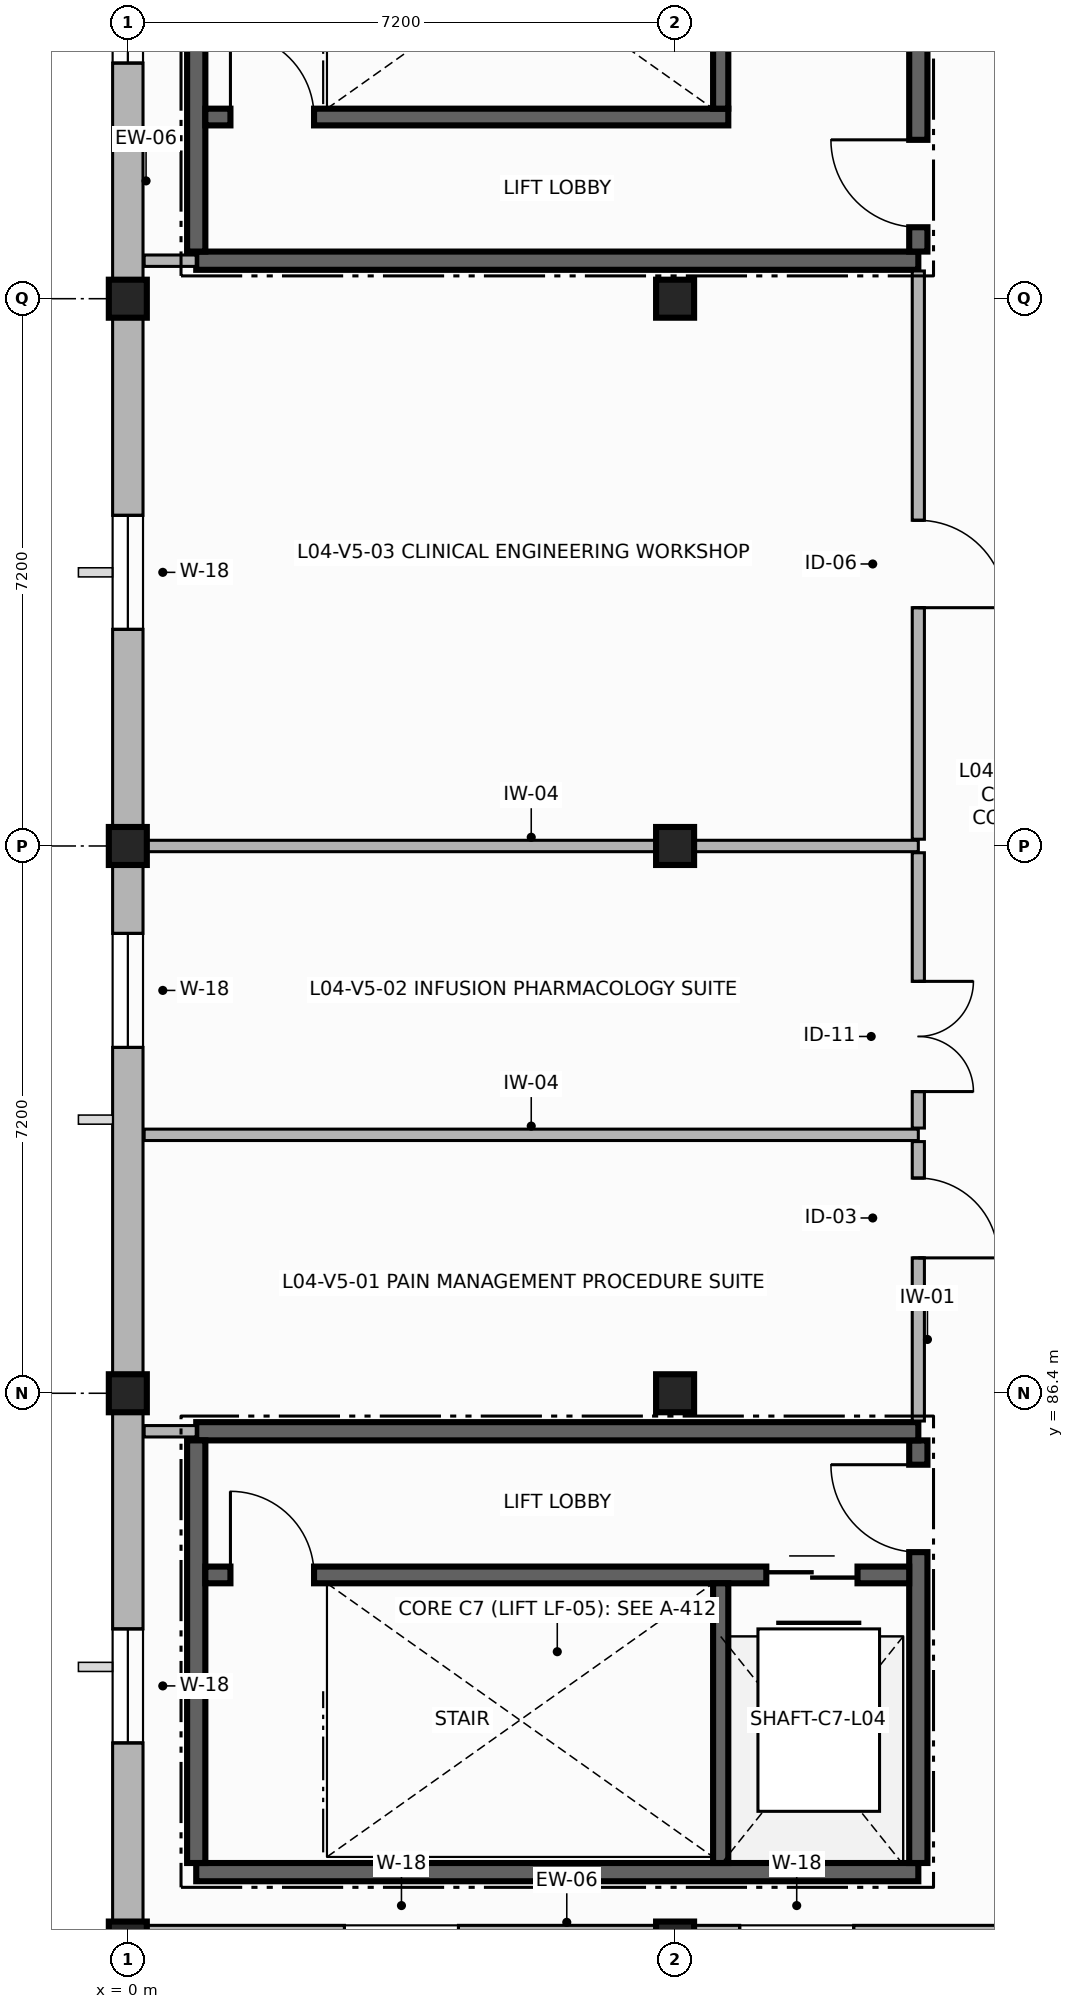
"""IFC4 building model, lengths in metres.
Left out: names, types, materials, properties, quantities, classifications, styles, units other than length and angle.
Written with IfcOpenShell. Run it as: python <this file> out.ifc"""

import sys

from ifc_helpers import new_model, si_unit, direction, frame, frame_2d, origin, origin_2d, place, context, subcontext, project, spatial, rectangle, extrude, element, fill, save


model = new_model("IFC4")
c1 = context("Model", 3, precision=1e-05, world=origin(), true_north=direction((0.0, 1.0)))
c2 = subcontext(c1, "Body", "Model", "MODEL_VIEW")
j1 = project(units=[si_unit("LENGTHUNIT", "METRE"), si_unit("PLANEANGLEUNIT", "RADIAN")], contexts=[c1])
p1 = place(None, origin())
s1 = spatial("IfcSite", under=j1, at=p1, CompositionType="ELEMENT")
p2 = place(p1, origin())
s2 = spatial("IfcBuilding", under=s1, at=p2, CompositionType="ELEMENT")
p3 = place(p2, frame((0.0, 0.0, 16.0)))
s3 = spatial("IfcBuildingStorey", under=s2, at=p3, CompositionType="ELEMENT", Elevation=16.0)
for number, where, z_axis, x_axis in (
    (1, (0.0, 79.2, 0.0), (0.0, 0.0, 1.0), (1.0, 0.0, 0.0)),
    (2, (0.0, 86.4, 0.0), (0.0, 0.0, 1.0), (1.0, 0.0, 0.0)),
    (3, (0.0, 93.6, 0.0), (0.0, 0.0, 1.0), (1.0, 0.0, 0.0)),
    (4, (0.0, 100.8, 0.0), (0.0, 0.0, 1.0), (1.0, 0.0, 0.0)),
    (5, (7.2, 79.2, 0.0), (0.0, 0.0, 1.0), (1.0, 0.0, 0.0)),
    (6, (7.2, 86.4, 0.0), (0.0, 0.0, 1.0), (1.0, 0.0, 0.0)),
    (7, (7.2, 93.6, 0.0), (0.0, 0.0, 1.0), (1.0, 0.0, 0.0)),
    (8, (7.2, 100.8, 0.0), (0.0, 0.0, 1.0), (1.0, 0.0, 0.0)),
):
    element("IfcColumn", number, at=place(p3, frame(where, z_axis=z_axis, x_axis=x_axis)), inside=s3, PredefinedType="COLUMN", context=c2, shape_type="SweptSolid", body=[
        extrude(rectangle(XDim=0.5, YDim=0.5, at=origin_2d()), origin(), (0.0, 0.0, 1.0), 3.46),
    ])
p4 = place(p3, frame((0.0, 79.2, 0.0), z_axis=(0.0, 0.0, 1.0), x_axis=(1.0, 0.0, 0.0)))
e9 = element("IfcWall", 9, at=p4, inside=s3, PredefinedType="SOLIDWALL", context=c2, shape_type="SweptSolid", body=[
    extrude(rectangle(XDim=7.2, YDim=0.4, at=frame_2d((3.6, 0.0))), origin(), (0.0, 0.0, 1.0), 2.79),
])
p5 = place(p4, frame((2.85, 0.0, 0.9)))
e10 = element("IfcOpeningElement", 10, at=p5, cuts=e9, PredefinedType="OPENING", context=c2, shape_type="SweptSolid", body=[
    extrude(rectangle(XDim=1.5, YDim=1.6, at=frame_2d((0.75, 0.8))), frame((0.0, 0.21, 0.0), z_axis=(0.0, -1.0, 0.0), x_axis=(1.0, 0.0, 0.0)), (0.0, 0.0, 1.0), 0.42),
])
p6 = place(p3, frame((7.2, 79.2, 0.0), z_axis=(0.0, 0.0, 1.0), x_axis=(1.0, 0.0, 0.0)))
e11 = element("IfcWall", 11, at=p6, inside=s3, PredefinedType="SOLIDWALL", context=c2, shape_type="SweptSolid", body=[
    extrude(rectangle(XDim=7.2, YDim=0.4, at=frame_2d((3.6, 0.0))), origin(), (0.0, 0.0, 1.0), 2.79),
])
p7 = place(p6, frame((0.85, 0.0, 0.9)))
e12 = element("IfcOpeningElement", 12, at=p7, cuts=e11, PredefinedType="OPENING", context=c2, shape_type="SweptSolid", body=[
    extrude(rectangle(XDim=1.5, YDim=1.6, at=frame_2d((0.75, 0.8))), frame((0.0, 0.21, 0.0), z_axis=(0.0, -1.0, 0.0), x_axis=(1.0, 0.0, 0.0)), (0.0, 0.0, 1.0), 0.42),
])
p8 = place(p3, frame((0.0, 108.0, 0.0), z_axis=(0.0, 0.0, 1.0), x_axis=(0.0, -1.0, 0.0)))
e13 = element("IfcWall", 13, at=p8, inside=s3, PredefinedType="SOLIDWALL", context=c2, shape_type="SweptSolid", body=[
    extrude(rectangle(XDim=7.2, YDim=0.4, at=frame_2d((3.6, 0.0))), origin(), (0.0, 0.0, 1.0), 2.79),
])
p9 = place(p8, frame((2.6, 0.0, 0.9)))
e14 = element("IfcOpeningElement", 14, at=p9, cuts=e13, PredefinedType="OPENING", context=c2, shape_type="SweptSolid", body=[
    extrude(rectangle(XDim=1.5, YDim=1.6, at=frame_2d((0.75, 0.8))), frame((0.0, 0.21, 0.0), z_axis=(0.0, -1.0, 0.0), x_axis=(1.0, 0.0, 0.0)), (0.0, 0.0, 1.0), 0.42),
])
p10 = place(p3, frame((0.0, 100.8, 0.0), z_axis=(0.0, 0.0, 1.0), x_axis=(0.0, -1.0, 0.0)))
e15 = element("IfcWall", 15, at=p10, inside=s3, PredefinedType="SOLIDWALL", context=c2, shape_type="SweptSolid", body=[
    extrude(rectangle(XDim=7.2, YDim=0.4, at=frame_2d((3.6, 0.0))), origin(), (0.0, 0.0, 1.0), 2.79),
])
p11 = place(p10, frame((2.85, 0.0, 0.9)))
e16 = element("IfcOpeningElement", 16, at=p11, cuts=e15, PredefinedType="OPENING", context=c2, shape_type="SweptSolid", body=[
    extrude(rectangle(XDim=1.5, YDim=1.6, at=frame_2d((0.75, 0.8))), frame((0.0, 0.21, 0.0), z_axis=(0.0, -1.0, 0.0), x_axis=(1.0, 0.0, 0.0)), (0.0, 0.0, 1.0), 0.42),
])
p12 = place(p3, frame((0.0, 93.6, 0.0), z_axis=(0.0, 0.0, 1.0), x_axis=(0.0, -1.0, 0.0)))
e17 = element("IfcWall", 17, at=p12, inside=s3, PredefinedType="SOLIDWALL", context=c2, shape_type="SweptSolid", body=[
    extrude(rectangle(XDim=7.2, YDim=0.4, at=frame_2d((3.6, 0.0))), origin(), (0.0, 0.0, 1.0), 2.79),
])
p13 = place(p12, frame((1.15, 0.0, 0.9)))
e18 = element("IfcOpeningElement", 18, at=p13, cuts=e17, PredefinedType="OPENING", context=c2, shape_type="SweptSolid", body=[
    extrude(rectangle(XDim=1.5, YDim=1.6, at=frame_2d((0.75, 0.8))), frame((0.0, 0.21, 0.0), z_axis=(0.0, -1.0, 0.0), x_axis=(1.0, 0.0, 0.0)), (0.0, 0.0, 1.0), 0.42),
])
p14 = place(p3, frame((0.0, 86.4, 0.0), z_axis=(0.0, 0.0, 1.0), x_axis=(0.0, -1.0, 0.0)))
e19 = element("IfcWall", 19, at=p14, inside=s3, PredefinedType="SOLIDWALL", context=c2, shape_type="SweptSolid", body=[
    extrude(rectangle(XDim=7.2, YDim=0.4, at=frame_2d((3.6, 0.0))), origin(), (0.0, 0.0, 1.0), 2.79),
])
p15 = place(p14, frame((3.1, 0.0, 0.9)))
e20 = element("IfcOpeningElement", 20, at=p15, cuts=e19, PredefinedType="OPENING", context=c2, shape_type="SweptSolid", body=[
    extrude(rectangle(XDim=1.5, YDim=1.6, at=frame_2d((0.75, 0.8))), frame((0.0, 0.21, 0.0), z_axis=(0.0, -1.0, 0.0), x_axis=(1.0, 0.0, 0.0)), (0.0, 0.0, 1.0), 0.42),
])
p16 = place(p3, frame((0.9, 80.1, 0.0), z_axis=(0.0, 0.0, 1.0), x_axis=(1.0, 0.0, 0.0)))
e21 = element("IfcWall", 21, at=p16, inside=s3, PredefinedType="SHEAR", context=c2, shape_type="SweptSolid", body=[
    extrude(rectangle(XDim=9.5, YDim=0.24, at=frame_2d((4.75, 0.0))), origin(), (0.0, 0.0, 1.0), 3.46),
])
p17 = place(p3, frame((10.4, 80.22, 0.0), z_axis=(0.0, 0.0, 1.0), x_axis=(0.0, 1.0, 0.0)))
e22 = element("IfcWall", 22, at=p17, inside=s3, PredefinedType="SHEAR", context=c2, shape_type="SweptSolid", body=[
    extrude(rectangle(XDim=5.56, YDim=0.24, at=frame_2d((2.78, 0.0))), origin(), (0.0, 0.0, 1.0), 3.46),
])
p18 = place(p17, frame((4.09, 0.0, 0.0)))
e23 = element("IfcOpeningElement", 23, at=p18, cuts=e22, PredefinedType="OPENING", context=c2, shape_type="SweptSolid", body=[
    extrude(rectangle(XDim=1.15, YDim=2.2, at=frame_2d((0.575, 1.1))), frame((0.0, 0.13, 0.0), z_axis=(0.0, -1.0, 0.0), x_axis=(1.0, 0.0, 0.0)), (0.0, 0.0, 1.0), 0.26),
])
p19 = place(p3, frame((10.4, 85.9, 0.0), z_axis=(0.0, 0.0, 1.0), x_axis=(-1.0, 0.0, 0.0)))
e24 = element("IfcWall", 24, at=p19, inside=s3, PredefinedType="SHEAR", context=c2, shape_type="SweptSolid", body=[
    extrude(rectangle(XDim=9.5, YDim=0.24, at=frame_2d((4.75, 0.0))), origin(), (0.0, 0.0, 1.0), 3.46),
])
p20 = place(p3, frame((0.9, 85.78, 0.0), z_axis=(0.0, 0.0, 1.0), x_axis=(0.0, -1.0, 0.0)))
e25 = element("IfcWall", 25, at=p20, inside=s3, PredefinedType="SHEAR", context=c2, shape_type="SweptSolid", body=[
    extrude(rectangle(XDim=5.56, YDim=0.24, at=frame_2d((2.78, 0.0))), origin(), (0.0, 0.0, 1.0), 3.46),
])
p21 = place(p3, frame((1.02, 84.01, 0.0), z_axis=(0.0, 0.0, 1.0), x_axis=(1.0, 0.0, 0.0)))
e26 = element("IfcWall", 26, at=p21, inside=s3, PredefinedType="SHEAR", context=c2, shape_type="SweptSolid", body=[
    extrude(rectangle(XDim=9.26, YDim=0.22, at=frame_2d((4.63, 0.0))), origin(), (0.0, 0.0, 1.0), 3.46),
])
p22 = place(p21, frame((0.33, 0.0, 0.0)))
e27 = element("IfcOpeningElement", 27, at=p22, cuts=e26, PredefinedType="OPENING", context=c2, shape_type="SweptSolid", body=[
    extrude(rectangle(XDim=1.1, YDim=2.15, at=frame_2d((0.55, 1.075))), frame((0.0, 0.12, 0.0), z_axis=(0.0, -1.0, 0.0), x_axis=(1.0, 0.0, 0.0)), (0.0, 0.0, 1.0), 0.24),
])
p23 = place(p21, frame((7.38, 0.0, 0.0)))
e28 = element("IfcOpeningElement", 28, at=p23, cuts=e26, PredefinedType="OPENING", context=c2, shape_type="SweptSolid", body=[
    extrude(rectangle(XDim=1.2, YDim=2.2, at=frame_2d((0.6, 1.1))), frame((0.0, 0.12, 0.0), z_axis=(0.0, -1.0, 0.0), x_axis=(1.0, 0.0, 0.0)), (0.0, 0.0, 1.0), 0.24),
])
p24 = place(p3, frame((7.8, 80.22, 0.0), z_axis=(0.0, 0.0, 1.0), x_axis=(0.0, 1.0, 0.0)))
e29 = element("IfcWall", 29, at=p24, inside=s3, PredefinedType="SHEAR", context=c2, shape_type="SweptSolid", body=[
    extrude(rectangle(XDim=3.68, YDim=0.2, at=frame_2d((1.84, 0.0))), origin(), (0.0, 0.0, 1.0), 3.46),
])
p25 = place(p3, frame((0.9, 101.3, 0.0), z_axis=(0.0, 0.0, 1.0), x_axis=(1.0, 0.0, 0.0)))
e30 = element("IfcWall", 30, at=p25, inside=s3, PredefinedType="SHEAR", context=c2, shape_type="SweptSolid", body=[
    extrude(rectangle(XDim=9.5, YDim=0.24, at=frame_2d((4.75, 0.0))), origin(), (0.0, 0.0, 1.0), 3.46),
])
p26 = place(p3, frame((10.4, 101.42, 0.0), z_axis=(0.0, 0.0, 1.0), x_axis=(0.0, 1.0, 0.0)))
e31 = element("IfcWall", 31, at=p26, inside=s3, PredefinedType="SHEAR", context=c2, shape_type="SweptSolid", body=[
    extrude(rectangle(XDim=5.56, YDim=0.24, at=frame_2d((2.78, 0.0))), origin(), (0.0, 0.0, 1.0), 3.46),
])
p27 = place(p26, frame((0.32, 0.0, 0.0)))
e32 = element("IfcOpeningElement", 32, at=p27, cuts=e31, PredefinedType="OPENING", context=c2, shape_type="SweptSolid", body=[
    extrude(rectangle(XDim=1.15, YDim=2.2, at=frame_2d((0.575, 1.1))), frame((0.0, 0.13, 0.0), z_axis=(0.0, -1.0, 0.0), x_axis=(1.0, 0.0, 0.0)), (0.0, 0.0, 1.0), 0.26),
])
p28 = place(p3, frame((0.9, 106.98, 0.0), z_axis=(0.0, 0.0, 1.0), x_axis=(0.0, -1.0, 0.0)))
e33 = element("IfcWall", 33, at=p28, inside=s3, PredefinedType="SHEAR", context=c2, shape_type="SweptSolid", body=[
    extrude(rectangle(XDim=5.56, YDim=0.24, at=frame_2d((2.78, 0.0))), origin(), (0.0, 0.0, 1.0), 3.46),
])
p29 = place(p3, frame((1.02, 103.19, 0.0), z_axis=(0.0, 0.0, 1.0), x_axis=(1.0, 0.0, 0.0)))
e34 = element("IfcWall", 34, at=p29, inside=s3, PredefinedType="SHEAR", context=c2, shape_type="SweptSolid", body=[
    extrude(rectangle(XDim=6.88, YDim=0.22, at=frame_2d((3.44, 0.0))), origin(), (0.0, 0.0, 1.0), 3.46),
])
p30 = place(p29, frame((0.33, 0.0, 0.0)))
e35 = element("IfcOpeningElement", 35, at=p30, cuts=e34, PredefinedType="OPENING", context=c2, shape_type="SweptSolid", body=[
    extrude(rectangle(XDim=1.1, YDim=2.15, at=frame_2d((0.55, 1.075))), frame((0.0, 0.12, 0.0), z_axis=(0.0, -1.0, 0.0), x_axis=(1.0, 0.0, 0.0)), (0.0, 0.0, 1.0), 0.24),
])
p31 = place(p3, frame((7.8, 103.3, 0.0), z_axis=(0.0, 0.0, 1.0), x_axis=(0.0, 1.0, 0.0)))
e36 = element("IfcWall", 36, at=p31, inside=s3, PredefinedType="SHEAR", context=c2, shape_type="SweptSolid", body=[
    extrude(rectangle(XDim=3.68, YDim=0.2, at=frame_2d((1.84, 0.0))), origin(), (0.0, 0.0, 1.0), 3.46),
])
p32 = place(p3, frame((0.215, 89.8, 0.0), z_axis=(0.0, 0.0, 1.0), x_axis=(1.0, 0.0, 0.0)))
e37 = element("IfcWall", 37, at=p32, inside=s3, PredefinedType="PARTITIONING", context=c2, shape_type="SweptSolid", body=[
    extrude(rectangle(XDim=10.185, YDim=0.15, at=frame_2d((5.092, 0.0))), origin(), (0.0, 0.0, 1.0), 2.78),
])
p33 = place(p3, frame((10.4, 89.711, 0.0), z_axis=(0.0, 0.0, 1.0), x_axis=(0.0, -1.0, 0.0)))
e38 = element("IfcWall", 38, at=p33, inside=s3, PredefinedType="PARTITIONING", context=c2, shape_type="SweptSolid", body=[
    extrude(rectangle(XDim=3.676, YDim=0.16, at=frame_2d((1.838, 0.0))), origin(), (0.0, 0.0, 1.0), 2.78),
])
p34 = place(p33, frame((0.48, 0.0, 0.0)))
e39 = element("IfcOpeningElement", 39, at=p34, cuts=e38, PredefinedType="OPENING", context=c2, shape_type="SweptSolid", body=[
    extrude(rectangle(XDim=1.05, YDim=2.15, at=frame_2d((0.525, 1.075))), frame((0.0, 0.09, 0.0), z_axis=(0.0, -1.0, 0.0), x_axis=(1.0, 0.0, 0.0)), (0.0, 0.0, 1.0), 0.18),
])
p35 = place(p3, frame((0.9, 85.9, 0.0), z_axis=(0.0, 0.0, 1.0), x_axis=(-1.0, 0.0, 0.0)))
e40 = element("IfcWall", 40, at=p35, inside=s3, PredefinedType="PARTITIONING", context=c2, shape_type="SweptSolid", body=[
    extrude(rectangle(XDim=0.685, YDim=0.15, at=frame_2d((0.342, 0.0))), origin(), (0.0, 0.0, 1.0), 2.78),
])
p36 = place(p3, frame((0.215, 93.6, 0.0), z_axis=(0.0, 0.0, 1.0), x_axis=(1.0, 0.0, 0.0)))
e41 = element("IfcWall", 41, at=p36, inside=s3, PredefinedType="PARTITIONING", context=c2, shape_type="SweptSolid", body=[
    extrude(rectangle(XDim=10.185, YDim=0.15, at=frame_2d((5.092, 0.0))), origin(), (0.0, 0.0, 1.0), 2.78),
])
p37 = place(p3, frame((10.4, 93.511, 0.0), z_axis=(0.0, 0.0, 1.0), x_axis=(0.0, -1.0, 0.0)))
e42 = element("IfcWall", 42, at=p37, inside=s3, PredefinedType="PARTITIONING", context=c2, shape_type="SweptSolid", body=[
    extrude(rectangle(XDim=3.622, YDim=0.16, at=frame_2d((1.811, 0.0))), origin(), (0.0, 0.0, 1.0), 2.78),
])
p38 = place(p37, frame((1.692, 0.0, 0.0)))
e43 = element("IfcOpeningElement", 43, at=p38, cuts=e42, PredefinedType="OPENING", context=c2, shape_type="SweptSolid", body=[
    extrude(rectangle(XDim=1.45, YDim=2.25, at=frame_2d((0.725, 1.125))), frame((0.0, 0.09, 0.0), z_axis=(0.0, -1.0, 0.0), x_axis=(1.0, 0.0, 0.0)), (0.0, 0.0, 1.0), 0.18),
])
p39 = place(p3, frame((0.215, 101.3, 0.0), z_axis=(0.0, 0.0, 1.0), x_axis=(1.0, 0.0, 0.0)))
e44 = element("IfcWall", 44, at=p39, inside=s3, PredefinedType="PARTITIONING", context=c2, shape_type="SweptSolid", body=[
    extrude(rectangle(XDim=0.685, YDim=0.15, at=frame_2d((0.342, 0.0))), origin(), (0.0, 0.0, 1.0), 2.78),
])
p40 = place(p3, frame((10.4, 101.165, 0.0), z_axis=(0.0, 0.0, 1.0), x_axis=(0.0, -1.0, 0.0)))
e45 = element("IfcWall", 45, at=p40, inside=s3, PredefinedType="PARTITIONING", context=c2, shape_type="SweptSolid", body=[
    extrude(rectangle(XDim=7.476, YDim=0.16, at=frame_2d((3.738, 0.0))), origin(), (0.0, 0.0, 1.0), 2.78),
])
p41 = place(p40, frame((3.28, 0.0, 0.0)))
e46 = element("IfcOpeningElement", 46, at=p41, cuts=e45, PredefinedType="OPENING", context=c2, shape_type="SweptSolid", body=[
    extrude(rectangle(XDim=1.15, YDim=2.25, at=frame_2d((0.575, 1.125))), frame((0.0, 0.09, 0.0), z_axis=(0.0, -1.0, 0.0), x_axis=(1.0, 0.0, 0.0)), (0.0, 0.0, 1.0), 0.18),
])
p42 = place(p9, origin())
e47 = element("IfcWindow", 47, at=p42, inside=s3, PartitioningType="SINGLE_PANEL", PredefinedType="WINDOW", context=c2, shape_type="SweptSolid", body=[
    extrude(rectangle(XDim=1.5, YDim=1.6, at=frame_2d((0.75, 0.8))), frame((0.0, 0.03, 0.0), z_axis=(0.0, -1.0, 0.0), x_axis=(1.0, 0.0, 0.0)), (0.0, 0.0, 1.0), 0.06),
])
fill(e14, e47)
p43 = place(p11, origin())
e48 = element("IfcWindow", 48, at=p43, inside=s3, PartitioningType="SINGLE_PANEL", PredefinedType="WINDOW", context=c2, shape_type="SweptSolid", body=[
    extrude(rectangle(XDim=1.5, YDim=1.6, at=frame_2d((0.75, 0.8))), frame((0.0, 0.03, 0.0), z_axis=(0.0, -1.0, 0.0), x_axis=(1.0, 0.0, 0.0)), (0.0, 0.0, 1.0), 0.06),
])
fill(e16, e48)
p44 = place(p13, origin())
e49 = element("IfcWindow", 49, at=p44, inside=s3, PartitioningType="SINGLE_PANEL", PredefinedType="WINDOW", context=c2, shape_type="SweptSolid", body=[
    extrude(rectangle(XDim=1.5, YDim=1.6, at=frame_2d((0.75, 0.8))), frame((0.0, 0.03, 0.0), z_axis=(0.0, -1.0, 0.0), x_axis=(1.0, 0.0, 0.0)), (0.0, 0.0, 1.0), 0.06),
])
fill(e18, e49)
p45 = place(p15, origin())
e50 = element("IfcWindow", 50, at=p45, inside=s3, PartitioningType="SINGLE_PANEL", PredefinedType="WINDOW", context=c2, shape_type="SweptSolid", body=[
    extrude(rectangle(XDim=1.5, YDim=1.6, at=frame_2d((0.75, 0.8))), frame((0.0, 0.03, 0.0), z_axis=(0.0, -1.0, 0.0), x_axis=(1.0, 0.0, 0.0)), (0.0, 0.0, 1.0), 0.06),
])
fill(e20, e50)
p46 = place(p22, origin())
e51 = element("IfcDoor", 51, at=p46, inside=s3, OperationType="SINGLE_SWING_LEFT", PredefinedType="DOOR", context=c2, shape_type="SweptSolid", body=[
    extrude(rectangle(XDim=1.1, YDim=2.15, at=frame_2d((0.55, 1.075))), frame((0.0, 0.025, 0.0), z_axis=(0.0, -1.0, 0.0), x_axis=(1.0, 0.0, 0.0)), (0.0, 0.0, 1.0), 0.05),
])
fill(e27, e51)
p47 = place(p23, origin())
e52 = element("IfcDoor", 52, at=p47, inside=s3, OperationType="DOUBLE_DOOR_SLIDING", PredefinedType="DOOR", context=c2, shape_type="SweptSolid", body=[
    extrude(rectangle(XDim=1.2, YDim=2.2, at=frame_2d((0.6, 1.1))), frame((0.0, 0.025, 0.0), z_axis=(0.0, -1.0, 0.0), x_axis=(1.0, 0.0, 0.0)), (0.0, 0.0, 1.0), 0.05),
])
fill(e28, e52)
p48 = place(p18, origin())
e53 = element("IfcDoor", 53, at=p48, inside=s3, OperationType="SINGLE_SWING_RIGHT", PredefinedType="DOOR", context=c2, shape_type="SweptSolid", body=[
    extrude(rectangle(XDim=1.15, YDim=2.2, at=frame_2d((0.575, 1.1))), frame((0.0, 0.025, 0.0), z_axis=(0.0, -1.0, 0.0), x_axis=(1.0, 0.0, 0.0)), (0.0, 0.0, 1.0), 0.05),
])
fill(e23, e53)
p49 = place(p30, origin())
e54 = element("IfcDoor", 54, at=p49, inside=s3, OperationType="SINGLE_SWING_LEFT", PredefinedType="DOOR", context=c2, shape_type="SweptSolid", body=[
    extrude(rectangle(XDim=1.1, YDim=2.15, at=frame_2d((0.55, 1.075))), frame((0.0, 0.025, 0.0), z_axis=(0.0, -1.0, 0.0), x_axis=(1.0, 0.0, 0.0)), (0.0, 0.0, 1.0), 0.05),
])
fill(e35, e54)
p50 = place(p27, origin())
e55 = element("IfcDoor", 55, at=p50, inside=s3, OperationType="SINGLE_SWING_RIGHT", PredefinedType="DOOR", context=c2, shape_type="SweptSolid", body=[
    extrude(rectangle(XDim=1.15, YDim=2.2, at=frame_2d((0.575, 1.1))), frame((0.0, 0.025, 0.0), z_axis=(0.0, -1.0, 0.0), x_axis=(1.0, 0.0, 0.0)), (0.0, 0.0, 1.0), 0.05),
])
fill(e32, e55)
p51 = place(p34, origin())
e56 = element("IfcDoor", 56, at=p51, inside=s3, OperationType="SINGLE_SWING_RIGHT", PredefinedType="DOOR", context=c2, shape_type="SweptSolid", body=[
    extrude(rectangle(XDim=1.05, YDim=2.15, at=frame_2d((0.525, 1.075))), frame((0.0, 0.025, 0.0), z_axis=(0.0, -1.0, 0.0), x_axis=(1.0, 0.0, 0.0)), (0.0, 0.0, 1.0), 0.05),
])
fill(e39, e56)
p52 = place(p38, origin())
e57 = element("IfcDoor", 57, at=p52, inside=s3, OperationType="DOUBLE_DOOR_SINGLE_SWING", PredefinedType="DOOR", context=c2, shape_type="SweptSolid", body=[
    extrude(rectangle(XDim=1.45, YDim=2.25, at=frame_2d((0.725, 1.125))), frame((0.0, 0.025, 0.0), z_axis=(0.0, -1.0, 0.0), x_axis=(1.0, 0.0, 0.0)), (0.0, 0.0, 1.0), 0.05),
])
fill(e43, e57)
p53 = place(p41, origin())
e58 = element("IfcDoor", 58, at=p53, inside=s3, OperationType="SINGLE_SWING_RIGHT", PredefinedType="DOOR", context=c2, shape_type="SweptSolid", body=[
    extrude(rectangle(XDim=1.15, YDim=2.25, at=frame_2d((0.575, 1.125))), frame((0.0, 0.025, 0.0), z_axis=(0.0, -1.0, 0.0), x_axis=(1.0, 0.0, 0.0)), (0.0, 0.0, 1.0), 0.05),
])
fill(e46, e58)
save(model, sys.argv[1])
